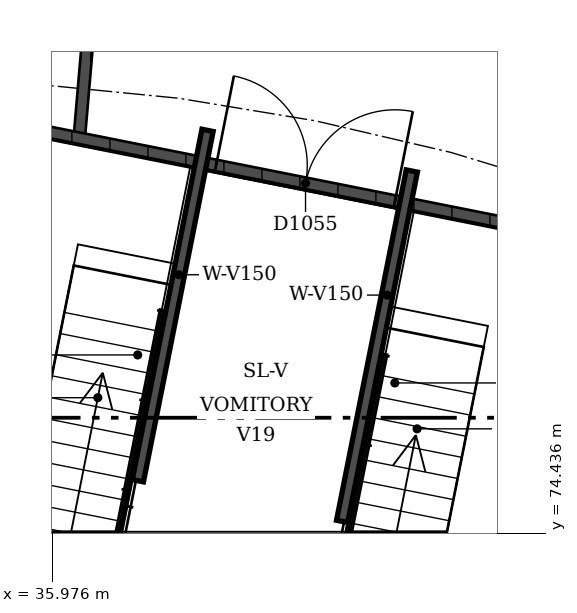
"""IFC4 building model, lengths in metres.
Left out: names, types, materials, properties, quantities, classifications, styles, units other than length and angle.
Written with IfcOpenShell. Run it as: python <this file> out.ifc"""

import sys

from ifc_helpers import new_model, si_unit, direction, frame, frame_2d, origin, place, context, subcontext, project, spatial, rectangle, extrude, element, fill, save


model = new_model("IFC4")
c1 = context("Model", 3, precision=1e-05, world=origin(), true_north=direction((0.0, 1.0)))
c2 = subcontext(c1, "Body", "Model", "MODEL_VIEW")
j1 = project(units=[si_unit("LENGTHUNIT", "METRE"), si_unit("PLANEANGLEUNIT", "RADIAN")], contexts=[c1])
p1 = place(None, origin())
s1 = spatial("IfcSite", under=j1, at=p1, CompositionType="ELEMENT")
p2 = place(p1, origin())
s2 = spatial("IfcBuilding", under=s1, at=p2, CompositionType="ELEMENT")
p3 = place(p2, origin())
s3 = spatial("IfcBuildingStorey", under=s2, at=p3, CompositionType="ELEMENT", Elevation=0.0)
p4 = place(p3, frame((36.333, 79.636, 0.0), z_axis=(0.0, 0.0, 1.0), x_axis=(0.085651910167, 0.996325122781, 0.0)))
e1 = element("IfcWall", 1, at=p4, inside=s3, PredefinedType="SOLIDWALL", context=c2, shape_type="SweptSolid", body=[
    extrude(rectangle(XDim=4.86, YDim=0.15, at=frame_2d((2.43, 0.0))), origin(), (0.0, 0.0, 1.0), 3.0),
])
p5 = place(p3, frame((34.4, 80.021, 0.0), z_axis=(0.0, 0.0, 1.0), x_axis=(0.980784963798, -0.195091913691, 0.0)))
e2 = element("IfcWall", 2, at=p5, inside=s3, PredefinedType="SOLIDWALL", context=c2, shape_type="SweptSolid", body=[
    extrude(rectangle(XDim=9.902, YDim=0.15, at=frame_2d((4.951, 0.0))), origin(), (0.0, 0.0, 1.0), 3.0),
])
p6 = place(p5, frame((3.806, 0.0, 0.0)))
e3 = element("IfcOpeningElement", 3, at=p6, cuts=e2, PredefinedType="OPENING", context=c2, shape_type="SweptSolid", body=[
    extrude(rectangle(XDim=2.4, YDim=2.4, at=frame_2d((1.2, 1.2))), frame((0.0, 0.075, 0.0), z_axis=(0.0, -1.0, 0.0), x_axis=(1.0, 0.0, 0.0)), (0.0, 0.0, 1.0), 0.15),
])
for number, where, z_axis, x_axis in (
    (4, (39.792, 74.595, 0.0), (0.0, 0.0, 1.0), (0.195, 0.981, 0.0)),
    (5, (37.104, 75.129, 0.0), (0.0, 0.0, 1.0), (0.195, 0.981, 0.0)),
):
    element("IfcWall", number, at=place(p3, frame(where, z_axis=z_axis, x_axis=x_axis)), inside=s3, PredefinedType="SOLIDWALL", context=c2, shape_type="SweptSolid", body=[
        extrude(rectangle(XDim=4.7, YDim=0.15, at=frame_2d((2.35, 0.0))), origin(), (0.0, 0.0, 1.0), 2.75),
    ])
p7 = place(p6, origin())
e6 = element("IfcDoor", 6, at=p7, inside=s3, OperationType="DOUBLE_DOOR_SINGLE_SWING", PredefinedType="DOOR", context=c2, shape_type="SweptSolid", body=[
    extrude(rectangle(XDim=2.4, YDim=2.4, at=frame_2d((1.2, 1.2))), frame((0.0, 0.025, 0.0), z_axis=(0.0, -1.0, 0.0), x_axis=(1.0, 0.0, 0.0)), (0.0, 0.0, 1.0), 0.05),
])
fill(e3, e6)
save(model, sys.argv[1])
